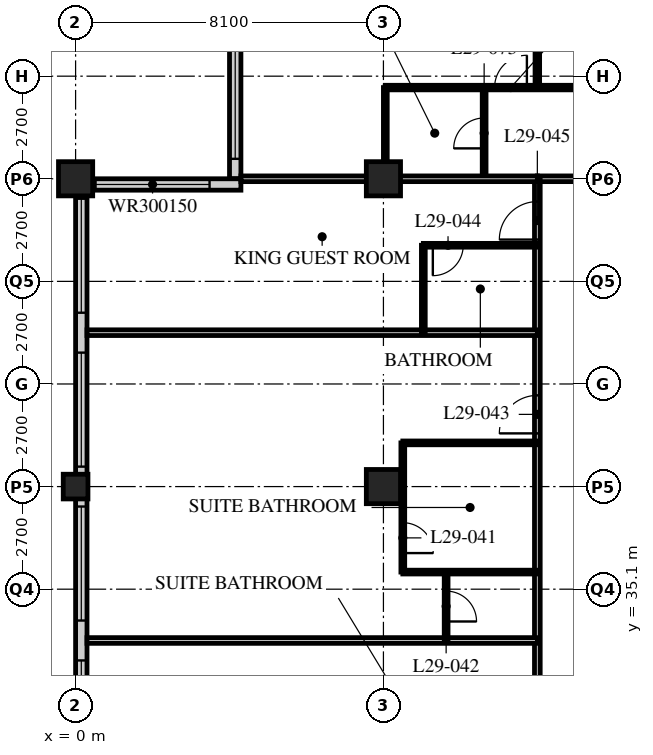
"""IFC4 building model, lengths in metres.
Left out: names, types, materials, properties, quantities, classifications, styles, units other than length and angle.
Written with IfcOpenShell. Run it as: python <this file> out.ifc"""

import sys

from ifc_helpers import new_model, si_unit, direction, frame, frame_2d, origin, origin_2d, place, context, subcontext, project, spatial, rectangle, hollow_rectangle, extrude, element, fill, save


model = new_model("IFC4")
c1 = context("Model", 3, precision=1e-05, world=origin(), true_north=direction((0.0, 1.0)))
c2 = subcontext(c1, "Body", "Model", "MODEL_VIEW")
j1 = project(units=[si_unit("LENGTHUNIT", "METRE"), si_unit("PLANEANGLEUNIT", "RADIAN")], contexts=[c1])
p1 = place(None, origin())
s1 = spatial("IfcSite", under=j1, at=p1, CompositionType="ELEMENT")
p2 = place(p1, origin())
s2 = spatial("IfcBuilding", under=s1, at=p2, CompositionType="ELEMENT")
p3 = place(p2, frame((0.0, 0.0, 117.0)))
s3 = spatial("IfcBuildingStorey", under=s2, at=p3, CompositionType="ELEMENT", Elevation=117.0)
p4 = place(p3, frame((0.0, 37.8, 0.0), z_axis=(0.0, 0.0, 1.0), x_axis=(1.0, 0.0, 0.0)))
e1 = element("IfcColumn", 1, at=p4, inside=s3, PredefinedType="COLUMN", context=c2, shape_type="SweptSolid", body=[
    extrude(hollow_rectangle(XDim=0.65, YDim=0.65, WallThickness=0.055, at=origin_2d()), origin(), (0.0, 0.0, 1.0), 3.4),
])
for number, where, z_axis, x_axis in (
    (2, (0.0, 45.9, 0.0), (0.0, 0.0, 1.0), (1.0, 0.0, 0.0)),
    (3, (8.1, 37.8, 0.0), (0.0, 0.0, 1.0), (1.0, 0.0, 0.0)),
    (4, (8.1, 45.9, 0.0), (0.0, 0.0, 1.0), (1.0, 0.0, 0.0)),
):
    element("IfcColumn", number, at=place(p3, frame(where, z_axis=z_axis, x_axis=x_axis)), inside=s3, PredefinedType="COLUMN", context=c2, shape_type="SweptSolid", body=[
        extrude(hollow_rectangle(XDim=0.9, YDim=0.9, WallThickness=0.09, at=origin_2d()), origin(), (0.0, 0.0, 1.0), 3.4),
    ])
p5 = place(p3, frame((4.2, 49.65, 0.0), z_axis=(0.0, 0.0, 1.0), x_axis=(0.0, -1.0, 0.0)))
e5 = element("IfcWall", 5, at=p5, inside=s3, PredefinedType="SOLIDWALL", context=c2, shape_type="SweptSolid", body=[
    extrude(rectangle(XDim=3.75, YDim=0.3, at=frame_2d((1.875, 0.0))), origin(), (0.0, 0.0, 1.0), 3.19),
])
p6 = place(p5, frame((0.225, 0.0, 0.9)))
e6 = element("IfcOpeningElement", 6, at=p6, cuts=e5, PredefinedType="OPENING", context=c2, shape_type="SweptSolid", body=[
    extrude(rectangle(XDim=3.0, YDim=1.5, at=frame_2d((1.5, 0.75))), frame((0.0, 0.16, 0.0), z_axis=(0.0, -1.0, 0.0), x_axis=(1.0, 0.0, 0.0)), (0.0, 0.0, 1.0), 0.32),
])
p7 = place(p3, frame((4.35, 45.75, 0.0), z_axis=(0.0, 0.0, 1.0), x_axis=(-1.0, 0.0, 0.0)))
e7 = element("IfcWall", 7, at=p7, inside=s3, PredefinedType="SOLIDWALL", context=c2, shape_type="SweptSolid", body=[
    extrude(rectangle(XDim=4.35, YDim=0.3, at=frame_2d((2.175, 0.0))), origin(), (0.0, 0.0, 1.0), 3.19),
])
p8 = place(p7, frame((0.825, 0.0, 0.9)))
e8 = element("IfcOpeningElement", 8, at=p8, cuts=e7, PredefinedType="OPENING", context=c2, shape_type="SweptSolid", body=[
    extrude(rectangle(XDim=3.0, YDim=1.5, at=frame_2d((1.5, 0.75))), frame((0.0, 0.16, 0.0), z_axis=(0.0, -1.0, 0.0), x_axis=(1.0, 0.0, 0.0)), (0.0, 0.0, 1.0), 0.32),
])
p9 = place(p3, frame((0.15, 45.6, 0.0), z_axis=(0.0, 0.0, 1.0), x_axis=(0.0, -1.0, 0.0)))
e9 = element("IfcWall", 9, at=p9, inside=s3, PredefinedType="SOLIDWALL", context=c2, shape_type="SweptSolid", body=[
    extrude(rectangle(XDim=32.1, YDim=0.3, at=frame_2d((16.05, 0.0))), origin(), (0.0, 0.0, 1.0), 3.19),
])
p10 = place(p9, frame((0.225, 0.0, 0.9)))
e10 = element("IfcOpeningElement", 10, at=p10, cuts=e9, PredefinedType="OPENING", context=c2, shape_type="SweptSolid", body=[
    extrude(rectangle(XDim=3.0, YDim=2.0, at=frame_2d((1.5, 1.0))), frame((0.0, 0.16, 0.0), z_axis=(0.0, -1.0, 0.0), x_axis=(1.0, 0.0, 0.0)), (0.0, 0.0, 1.0), 0.32),
])
p11 = place(p9, frame((4.275, 0.0, 0.9)))
e11 = element("IfcOpeningElement", 11, at=p11, cuts=e9, PredefinedType="OPENING", context=c2, shape_type="SweptSolid", body=[
    extrude(rectangle(XDim=3.0, YDim=2.0, at=frame_2d((1.5, 1.0))), frame((0.0, 0.16, 0.0), z_axis=(0.0, -1.0, 0.0), x_axis=(1.0, 0.0, 0.0)), (0.0, 0.0, 1.0), 0.32),
])
p12 = place(p9, frame((8.325, 0.0, 0.9)))
e12 = element("IfcOpeningElement", 12, at=p12, cuts=e9, PredefinedType="OPENING", context=c2, shape_type="SweptSolid", body=[
    extrude(rectangle(XDim=3.0, YDim=2.0, at=frame_2d((1.5, 1.0))), frame((0.0, 0.16, 0.0), z_axis=(0.0, -1.0, 0.0), x_axis=(1.0, 0.0, 0.0)), (0.0, 0.0, 1.0), 0.32),
])
p13 = place(p9, frame((12.375, 0.0, 0.9)))
e13 = element("IfcOpeningElement", 13, at=p13, cuts=e9, PredefinedType="OPENING", context=c2, shape_type="SweptSolid", body=[
    extrude(rectangle(XDim=3.0, YDim=2.0, at=frame_2d((1.5, 1.0))), frame((0.0, 0.16, 0.0), z_axis=(0.0, -1.0, 0.0), x_axis=(1.0, 0.0, 0.0)), (0.0, 0.0, 1.0), 0.32),
])
p14 = place(p9, frame((16.425, 0.0, 0.9)))
e14 = element("IfcOpeningElement", 14, at=p14, cuts=e9, PredefinedType="OPENING", context=c2, shape_type="SweptSolid", body=[
    extrude(rectangle(XDim=3.0, YDim=2.0, at=frame_2d((1.5, 1.0))), frame((0.0, 0.16, 0.0), z_axis=(0.0, -1.0, 0.0), x_axis=(1.0, 0.0, 0.0)), (0.0, 0.0, 1.0), 0.32),
])
p15 = place(p9, frame((20.475, 0.0, 0.9)))
e15 = element("IfcOpeningElement", 15, at=p15, cuts=e9, PredefinedType="OPENING", context=c2, shape_type="SweptSolid", body=[
    extrude(rectangle(XDim=3.0, YDim=2.0, at=frame_2d((1.5, 1.0))), frame((0.0, 0.16, 0.0), z_axis=(0.0, -1.0, 0.0), x_axis=(1.0, 0.0, 0.0)), (0.0, 0.0, 1.0), 0.32),
])
p16 = place(p9, frame((24.525, 0.0, 0.9)))
e16 = element("IfcOpeningElement", 16, at=p16, cuts=e9, PredefinedType="OPENING", context=c2, shape_type="SweptSolid", body=[
    extrude(rectangle(XDim=3.0, YDim=2.0, at=frame_2d((1.5, 1.0))), frame((0.0, 0.16, 0.0), z_axis=(0.0, -1.0, 0.0), x_axis=(1.0, 0.0, 0.0)), (0.0, 0.0, 1.0), 0.32),
])
p17 = place(p9, frame((28.575, 0.0, 0.9)))
e17 = element("IfcOpeningElement", 17, at=p17, cuts=e9, PredefinedType="OPENING", context=c2, shape_type="SweptSolid", body=[
    extrude(rectangle(XDim=3.0, YDim=2.0, at=frame_2d((1.5, 1.0))), frame((0.0, 0.16, 0.0), z_axis=(0.0, -1.0, 0.0), x_axis=(1.0, 0.0, 0.0)), (0.0, 0.0, 1.0), 0.32),
])
p18 = place(p3, frame((12.15, 45.9, 0.0), z_axis=(0.0, 0.0, 1.0), x_axis=(1.0, 0.0, 0.0)))
e18 = element("IfcWall", 18, at=p18, inside=s3, PredefinedType="PARTITIONING", context=c2, shape_type="SweptSolid", body=[
    extrude(rectangle(XDim=32.4, YDim=0.15, at=frame_2d((16.2, 0.0))), origin(), (0.0, 0.0, 1.0), 2.578),
])
p19 = place(p18, frame((5.95, 0.0, 0.0)))
e19 = element("IfcOpeningElement", 19, at=p19, cuts=e18, PredefinedType="OPENING", context=c2, shape_type="SweptSolid", body=[
    extrude(rectangle(XDim=1.0, YDim=2.1, at=frame_2d((0.5, 1.05))), frame((0.0, 0.085, 0.0), z_axis=(0.0, -1.0, 0.0), x_axis=(1.0, 0.0, 0.0)), (0.0, 0.0, 1.0), 0.17),
])
p20 = place(p18, frame((14.05, 0.0, 0.0)))
e20 = element("IfcOpeningElement", 20, at=p20, cuts=e18, PredefinedType="OPENING", context=c2, shape_type="SweptSolid", body=[
    extrude(rectangle(XDim=1.0, YDim=2.1, at=frame_2d((0.5, 1.05))), frame((0.0, 0.085, 0.0), z_axis=(0.0, -1.0, 0.0), x_axis=(1.0, 0.0, 0.0)), (0.0, 0.0, 1.0), 0.17),
])
p21 = place(p18, frame((25.7, 0.0, 0.0)))
e21 = element("IfcOpeningElement", 21, at=p21, cuts=e18, PredefinedType="OPENING", context=c2, shape_type="SweptSolid", body=[
    extrude(rectangle(XDim=1.0, YDim=2.1, at=frame_2d((0.5, 1.05))), frame((0.0, 0.085, 0.0), z_axis=(0.0, -1.0, 0.0), x_axis=(1.0, 0.0, 0.0)), (0.0, 0.0, 1.0), 0.17),
])
p22 = place(p18, frame((29.875, 0.0, 0.0)))
e22 = element("IfcOpeningElement", 22, at=p22, cuts=e18, PredefinedType="OPENING", context=c2, shape_type="SweptSolid", body=[
    extrude(rectangle(XDim=1.0, YDim=2.1, at=frame_2d((0.5, 1.05))), frame((0.0, 0.085, 0.0), z_axis=(0.0, -1.0, 0.0), x_axis=(1.0, 0.0, 0.0)), (0.0, 0.0, 1.0), 0.17),
])
p23 = place(p18, frame((1.525, 0.0, 0.0)))
e23 = element("IfcOpeningElement", 23, at=p23, cuts=e18, PredefinedType="OPENING", context=c2, shape_type="SweptSolid", body=[
    extrude(rectangle(XDim=1.0, YDim=2.1, at=frame_2d((0.5, 1.05))), frame((0.0, 0.085, 0.0), z_axis=(0.0, -1.0, 0.0), x_axis=(1.0, 0.0, 0.0)), (0.0, 0.0, 1.0), 0.17),
])
p24 = place(p3, frame((12.15, 17.55, 0.0), z_axis=(0.0, 0.0, 1.0), x_axis=(0.0, 1.0, 0.0)))
e24 = element("IfcWall", 24, at=p24, inside=s3, PredefinedType="PARTITIONING", context=c2, shape_type="SweptSolid", body=[
    extrude(rectangle(XDim=28.35, YDim=0.15, at=frame_2d((14.175, 0.0))), origin(), (0.0, 0.0, 1.0), 3.19),
])
p25 = place(p24, frame((5.45, 0.0, 0.0)))
e25 = element("IfcOpeningElement", 25, at=p25, cuts=e24, PredefinedType="OPENING", context=c2, shape_type="SweptSolid", body=[
    extrude(rectangle(XDim=1.0, YDim=2.1, at=frame_2d((0.5, 1.05))), frame((0.0, 0.085, 0.0), z_axis=(0.0, -1.0, 0.0), x_axis=(1.0, 0.0, 0.0)), (0.0, 0.0, 1.0), 0.17),
])
p26 = place(p24, frame((13.55, 0.0, 0.0)))
e26 = element("IfcOpeningElement", 26, at=p26, cuts=e24, PredefinedType="OPENING", context=c2, shape_type="SweptSolid", body=[
    extrude(rectangle(XDim=1.0, YDim=2.1, at=frame_2d((0.5, 1.05))), frame((0.0, 0.085, 0.0), z_axis=(0.0, -1.0, 0.0), x_axis=(1.0, 0.0, 0.0)), (0.0, 0.0, 1.0), 0.17),
])
p27 = place(p24, frame((21.65, 0.0, 0.0)))
e27 = element("IfcOpeningElement", 27, at=p27, cuts=e24, PredefinedType="OPENING", context=c2, shape_type="SweptSolid", body=[
    extrude(rectangle(XDim=1.0, YDim=2.1, at=frame_2d((0.5, 1.05))), frame((0.0, 0.085, 0.0), z_axis=(0.0, -1.0, 0.0), x_axis=(1.0, 0.0, 0.0)), (0.0, 0.0, 1.0), 0.17),
])
p28 = place(p24, frame((26.75, 0.0, 0.0)))
e28 = element("IfcOpeningElement", 28, at=p28, cuts=e24, PredefinedType="OPENING", context=c2, shape_type="SweptSolid", body=[
    extrude(rectangle(XDim=1.0, YDim=2.1, at=frame_2d((0.5, 1.05))), frame((0.0, 0.085, 0.0), z_axis=(0.0, -1.0, 0.0), x_axis=(1.0, 0.0, 0.0)), (0.0, 0.0, 1.0), 0.17),
])
p29 = place(p3, frame((12.15, 33.75, 0.0), z_axis=(0.0, 0.0, 1.0), x_axis=(-1.0, 0.0, 0.0)))
e29 = element("IfcWall", 29, at=p29, inside=s3, PredefinedType="PARTITIONING", context=c2, shape_type="SweptSolid", body=[
    extrude(rectangle(XDim=11.85, YDim=0.15, at=frame_2d((5.925, 0.0))), origin(), (0.0, 0.0, 1.0), 3.19),
])
p30 = place(p3, frame((8.61, 35.55, 0.0), z_axis=(0.0, 0.0, 1.0), x_axis=(0.0, 1.0, 0.0)))
e30 = element("IfcWall", 30, at=p30, inside=s3, PredefinedType="PARTITIONING", context=c2, shape_type="SweptSolid", body=[
    extrude(rectangle(XDim=3.4, YDim=0.1, at=frame_2d((1.7, 0.0))), origin(), (0.0, 0.0, 1.0), 3.19),
])
p31 = place(p30, frame((0.5, 0.0, 0.0)))
e31 = element("IfcOpeningElement", 31, at=p31, cuts=e30, PredefinedType="OPENING", context=c2, shape_type="SweptSolid", body=[
    extrude(rectangle(XDim=0.8, YDim=2.1, at=frame_2d((0.4, 1.05))), frame((0.0, 0.06, 0.0), z_axis=(0.0, -1.0, 0.0), x_axis=(1.0, 0.0, 0.0)), (0.0, 0.0, 1.0), 0.12),
])
p32 = place(p3, frame((9.75, 33.75, 0.0), z_axis=(0.0, 0.0, 1.0), x_axis=(0.0, 1.0, 0.0)))
e32 = element("IfcWall", 32, at=p32, inside=s3, PredefinedType="PARTITIONING", context=c2, shape_type="SweptSolid", body=[
    extrude(rectangle(XDim=1.8, YDim=0.1, at=frame_2d((0.9, 0.0))), origin(), (0.0, 0.0, 1.0), 3.19),
])
p33 = place(p32, frame((0.5, 0.0, 0.0)))
e33 = element("IfcOpeningElement", 33, at=p33, cuts=e32, PredefinedType="OPENING", context=c2, shape_type="SweptSolid", body=[
    extrude(rectangle(XDim=0.8, YDim=2.1, at=frame_2d((0.4, 1.05))), frame((0.0, 0.06, 0.0), z_axis=(0.0, -1.0, 0.0), x_axis=(1.0, 0.0, 0.0)), (0.0, 0.0, 1.0), 0.12),
])
for number, where, z_axis, x_axis in (
    (34, (12.15, 35.55, 0.0), (0.0, 0.0, 1.0), (-1.0, 0.0, 0.0)),
    (35, (12.15, 38.95, 0.0), (0.0, 0.0, 1.0), (-1.0, 0.0, 0.0)),
):
    element("IfcWall", number, at=place(p3, frame(where, z_axis=z_axis, x_axis=x_axis)), inside=s3, PredefinedType="PARTITIONING", context=c2, shape_type="SweptSolid", body=[
        extrude(rectangle(XDim=3.54, YDim=0.1, at=frame_2d((1.77, 0.0))), origin(), (0.0, 0.0, 1.0), 3.19),
    ])
p34 = place(p3, frame((12.15, 41.85, 0.0), z_axis=(0.0, 0.0, 1.0), x_axis=(-1.0, 0.0, 0.0)))
e36 = element("IfcWall", 36, at=p34, inside=s3, PredefinedType="PARTITIONING", context=c2, shape_type="SweptSolid", body=[
    extrude(rectangle(XDim=11.85, YDim=0.15, at=frame_2d((5.925, 0.0))), origin(), (0.0, 0.0, 1.0), 3.19),
])
p35 = place(p3, frame((9.15, 41.85, 0.0), z_axis=(0.0, 0.0, 1.0), x_axis=(0.0, 1.0, 0.0)))
e37 = element("IfcWall", 37, at=p35, inside=s3, PredefinedType="PARTITIONING", context=c2, shape_type="SweptSolid", body=[
    extrude(rectangle(XDim=2.3, YDim=0.1, at=frame_2d((1.15, 0.0))), origin(), (0.0, 0.0, 1.0), 3.19),
])
p36 = place(p3, frame((12.15, 44.15, 0.0), z_axis=(0.0, 0.0, 1.0), x_axis=(-1.0, 0.0, 0.0)))
e38 = element("IfcWall", 38, at=p36, inside=s3, PredefinedType="PARTITIONING", context=c2, shape_type="SweptSolid", body=[
    extrude(rectangle(XDim=3.0, YDim=0.1, at=frame_2d((1.5, 0.0))), origin(), (0.0, 0.0, 1.0), 3.19),
])
p37 = place(p36, frame((1.95, 0.0, 0.0)))
e39 = element("IfcOpeningElement", 39, at=p37, cuts=e38, PredefinedType="OPENING", context=c2, shape_type="SweptSolid", body=[
    extrude(rectangle(XDim=0.8, YDim=2.1, at=frame_2d((0.4, 1.05))), frame((0.0, 0.06, 0.0), z_axis=(0.0, -1.0, 0.0), x_axis=(1.0, 0.0, 0.0)), (0.0, 0.0, 1.0), 0.12),
])
p38 = place(p3, frame((10.75, 45.9, 0.0), z_axis=(0.0, 0.0, 1.0), x_axis=(0.0, 1.0, 0.0)))
e40 = element("IfcWall", 40, at=p38, inside=s3, PredefinedType="PARTITIONING", context=c2, shape_type="SweptSolid", body=[
    extrude(rectangle(XDim=2.4, YDim=0.1, at=frame_2d((1.2, 0.0))), origin(), (0.0, 0.0, 1.0), 3.19),
])
p39 = place(p38, frame((0.8, 0.0, 0.0)))
e41 = element("IfcOpeningElement", 41, at=p39, cuts=e40, PredefinedType="OPENING", context=c2, shape_type="SweptSolid", body=[
    extrude(rectangle(XDim=0.8, YDim=2.1, at=frame_2d((0.4, 1.05))), frame((0.0, 0.06, 0.0), z_axis=(0.0, -1.0, 0.0), x_axis=(1.0, 0.0, 0.0)), (0.0, 0.0, 1.0), 0.12),
])
p40 = place(p3, frame((8.15, 45.9, 0.0), z_axis=(0.0, 0.0, 1.0), x_axis=(0.0, 1.0, 0.0)))
e42 = element("IfcWall", 42, at=p40, inside=s3, PredefinedType="PARTITIONING", context=c2, shape_type="SweptSolid", body=[
    extrude(rectangle(XDim=2.4, YDim=0.1, at=frame_2d((1.2, 0.0))), origin(), (0.0, 0.0, 1.0), 2.578),
])
p41 = place(p3, frame((8.15, 48.3, 0.0), z_axis=(0.0, 0.0, 1.0), x_axis=(1.0, 0.0, 0.0)))
e43 = element("IfcWall", 43, at=p41, inside=s3, PredefinedType="PARTITIONING", context=c2, shape_type="SweptSolid", body=[
    extrude(rectangle(XDim=8.05, YDim=0.12, at=frame_2d((4.025, 0.0))), origin(), (0.0, 0.0, 1.0), 3.19),
])
p42 = place(p41, frame((6.725, 0.0, 0.0)))
e44 = element("IfcOpeningElement", 44, at=p42, cuts=e43, PredefinedType="OPENING", context=c2, shape_type="SweptSolid", body=[
    extrude(rectangle(XDim=0.85, YDim=2.1, at=frame_2d((0.425, 1.05))), frame((0.0, 0.07, 0.0), z_axis=(0.0, -1.0, 0.0), x_axis=(1.0, 0.0, 0.0)), (0.0, 0.0, 1.0), 0.14),
])
p43 = place(p41, frame((2.875, 0.0, 0.0)))
e45 = element("IfcOpeningElement", 45, at=p43, cuts=e43, PredefinedType="OPENING", context=c2, shape_type="SweptSolid", body=[
    extrude(rectangle(XDim=0.85, YDim=2.1, at=frame_2d((0.425, 1.05))), frame((0.0, 0.07, 0.0), z_axis=(0.0, -1.0, 0.0), x_axis=(1.0, 0.0, 0.0)), (0.0, 0.0, 1.0), 0.14),
])
p44 = place(p3, frame((12.15, 48.3, 0.0), z_axis=(0.0, 0.0, 1.0), x_axis=(0.0, 1.0, 0.0)))
e46 = element("IfcWall", 46, at=p44, inside=s3, PredefinedType="PARTITIONING", context=c2, shape_type="SweptSolid", body=[
    extrude(rectangle(XDim=5.4, YDim=0.12, at=frame_2d((2.7, 0.0))), origin(), (0.0, 0.0, 1.0), 3.19),
])
p45 = place(p3, frame((4.35, 45.9, 0.0), z_axis=(0.0, 0.0, 1.0), x_axis=(1.0, 0.0, 0.0)))
e47 = element("IfcWall", 47, at=p45, inside=s3, PredefinedType="PARTITIONING", context=c2, shape_type="SweptSolid", body=[
    extrude(rectangle(XDim=7.8, YDim=0.15, at=frame_2d((3.9, 0.0))), origin(), (0.0, 0.0, 1.0), 2.578),
])
p46 = place(p6, origin())
e48 = element("IfcWindow", 48, at=p46, inside=s3, PartitioningType="SINGLE_PANEL", PredefinedType="WINDOW", context=c2, shape_type="SweptSolid", body=[
    extrude(rectangle(XDim=3.0, YDim=1.5, at=frame_2d((1.5, 0.75))), frame((0.0, 0.03, 0.0), z_axis=(0.0, -1.0, 0.0), x_axis=(1.0, 0.0, 0.0)), (0.0, 0.0, 1.0), 0.06),
])
fill(e6, e48)
p47 = place(p8, origin())
e49 = element("IfcWindow", 49, at=p47, inside=s3, PartitioningType="SINGLE_PANEL", PredefinedType="WINDOW", context=c2, shape_type="SweptSolid", body=[
    extrude(rectangle(XDim=3.0, YDim=1.5, at=frame_2d((1.5, 0.75))), frame((0.0, 0.03, 0.0), z_axis=(0.0, -1.0, 0.0), x_axis=(1.0, 0.0, 0.0)), (0.0, 0.0, 1.0), 0.06),
])
fill(e8, e49)
p48 = place(p10, origin())
e50 = element("IfcWindow", 50, at=p48, inside=s3, PartitioningType="SINGLE_PANEL", PredefinedType="WINDOW", context=c2, shape_type="SweptSolid", body=[
    extrude(rectangle(XDim=3.0, YDim=2.0, at=frame_2d((1.5, 1.0))), frame((0.0, 0.03, 0.0), z_axis=(0.0, -1.0, 0.0), x_axis=(1.0, 0.0, 0.0)), (0.0, 0.0, 1.0), 0.06),
])
fill(e10, e50)
p49 = place(p11, origin())
e51 = element("IfcWindow", 51, at=p49, inside=s3, PartitioningType="SINGLE_PANEL", PredefinedType="WINDOW", context=c2, shape_type="SweptSolid", body=[
    extrude(rectangle(XDim=3.0, YDim=2.0, at=frame_2d((1.5, 1.0))), frame((0.0, 0.03, 0.0), z_axis=(0.0, -1.0, 0.0), x_axis=(1.0, 0.0, 0.0)), (0.0, 0.0, 1.0), 0.06),
])
fill(e11, e51)
p50 = place(p12, origin())
e52 = element("IfcWindow", 52, at=p50, inside=s3, PartitioningType="SINGLE_PANEL", PredefinedType="WINDOW", context=c2, shape_type="SweptSolid", body=[
    extrude(rectangle(XDim=3.0, YDim=2.0, at=frame_2d((1.5, 1.0))), frame((0.0, 0.03, 0.0), z_axis=(0.0, -1.0, 0.0), x_axis=(1.0, 0.0, 0.0)), (0.0, 0.0, 1.0), 0.06),
])
fill(e12, e52)
p51 = place(p13, origin())
e53 = element("IfcWindow", 53, at=p51, inside=s3, PartitioningType="SINGLE_PANEL", PredefinedType="WINDOW", context=c2, shape_type="SweptSolid", body=[
    extrude(rectangle(XDim=3.0, YDim=2.0, at=frame_2d((1.5, 1.0))), frame((0.0, 0.03, 0.0), z_axis=(0.0, -1.0, 0.0), x_axis=(1.0, 0.0, 0.0)), (0.0, 0.0, 1.0), 0.06),
])
fill(e13, e53)
p52 = place(p31, origin())
e54 = element("IfcDoor", 54, at=p52, inside=s3, OperationType="SINGLE_SWING_RIGHT", PredefinedType="DOOR", context=c2, shape_type="SweptSolid", body=[
    extrude(rectangle(XDim=0.8, YDim=2.1, at=frame_2d((0.4, 1.05))), frame((0.0, 0.025, 0.0), z_axis=(0.0, -1.0, 0.0), x_axis=(1.0, 0.0, 0.0)), (0.0, 0.0, 1.0), 0.05),
])
fill(e31, e54)
p53 = place(p33, origin())
e55 = element("IfcDoor", 55, at=p53, inside=s3, OperationType="SINGLE_SWING_RIGHT", PredefinedType="DOOR", context=c2, shape_type="SweptSolid", body=[
    extrude(rectangle(XDim=0.8, YDim=2.1, at=frame_2d((0.4, 1.05))), frame((0.0, 0.025, 0.0), z_axis=(0.0, -1.0, 0.0), x_axis=(1.0, 0.0, 0.0)), (0.0, 0.0, 1.0), 0.05),
])
fill(e33, e55)
p54 = place(p27, origin())
e56 = element("IfcDoor", 56, at=p54, inside=s3, OperationType="SINGLE_SWING_LEFT", PredefinedType="DOOR", context=c2, shape_type="SweptSolid", body=[
    extrude(rectangle(XDim=1.0, YDim=2.1, at=frame_2d((0.5, 1.05))), frame((0.0, 0.025, 0.0), z_axis=(0.0, -1.0, 0.0), x_axis=(1.0, 0.0, 0.0)), (0.0, 0.0, 1.0), 0.05),
])
fill(e27, e56)
p55 = place(p37, origin())
e57 = element("IfcDoor", 57, at=p55, inside=s3, OperationType="SINGLE_SWING_RIGHT", PredefinedType="DOOR", context=c2, shape_type="SweptSolid", body=[
    extrude(rectangle(XDim=0.8, YDim=2.1, at=frame_2d((0.4, 1.05))), frame((0.0, 0.025, 0.0), z_axis=(0.0, -1.0, 0.0), x_axis=(1.0, 0.0, 0.0)), (0.0, 0.0, 1.0), 0.05),
])
fill(e39, e57)
p56 = place(p28, origin())
e58 = element("IfcDoor", 58, at=p56, inside=s3, OperationType="SINGLE_SWING_LEFT", PredefinedType="DOOR", context=c2, shape_type="SweptSolid", body=[
    extrude(rectangle(XDim=1.0, YDim=2.1, at=frame_2d((0.5, 1.05))), frame((0.0, 0.025, 0.0), z_axis=(0.0, -1.0, 0.0), x_axis=(1.0, 0.0, 0.0)), (0.0, 0.0, 1.0), 0.05),
])
fill(e28, e58)
p57 = place(p39, origin())
e59 = element("IfcDoor", 59, at=p57, inside=s3, OperationType="SINGLE_SWING_LEFT", PredefinedType="DOOR", context=c2, shape_type="SweptSolid", body=[
    extrude(rectangle(XDim=0.8, YDim=2.1, at=frame_2d((0.4, 1.05))), frame((0.0, 0.025, 0.0), z_axis=(0.0, -1.0, 0.0), x_axis=(1.0, 0.0, 0.0)), (0.0, 0.0, 1.0), 0.05),
])
fill(e41, e59)
p58 = place(p43, origin())
e60 = element("IfcDoor", 60, at=p58, inside=s3, OperationType="SINGLE_SWING_RIGHT", PredefinedType="DOOR", context=c2, shape_type="SweptSolid", body=[
    extrude(rectangle(XDim=0.85, YDim=2.1, at=frame_2d((0.425, 1.05))), frame((0.0, 0.025, 0.0), z_axis=(0.0, -1.0, 0.0), x_axis=(1.0, 0.0, 0.0)), (0.0, 0.0, 1.0), 0.05),
])
fill(e45, e60)
save(model, sys.argv[1])
